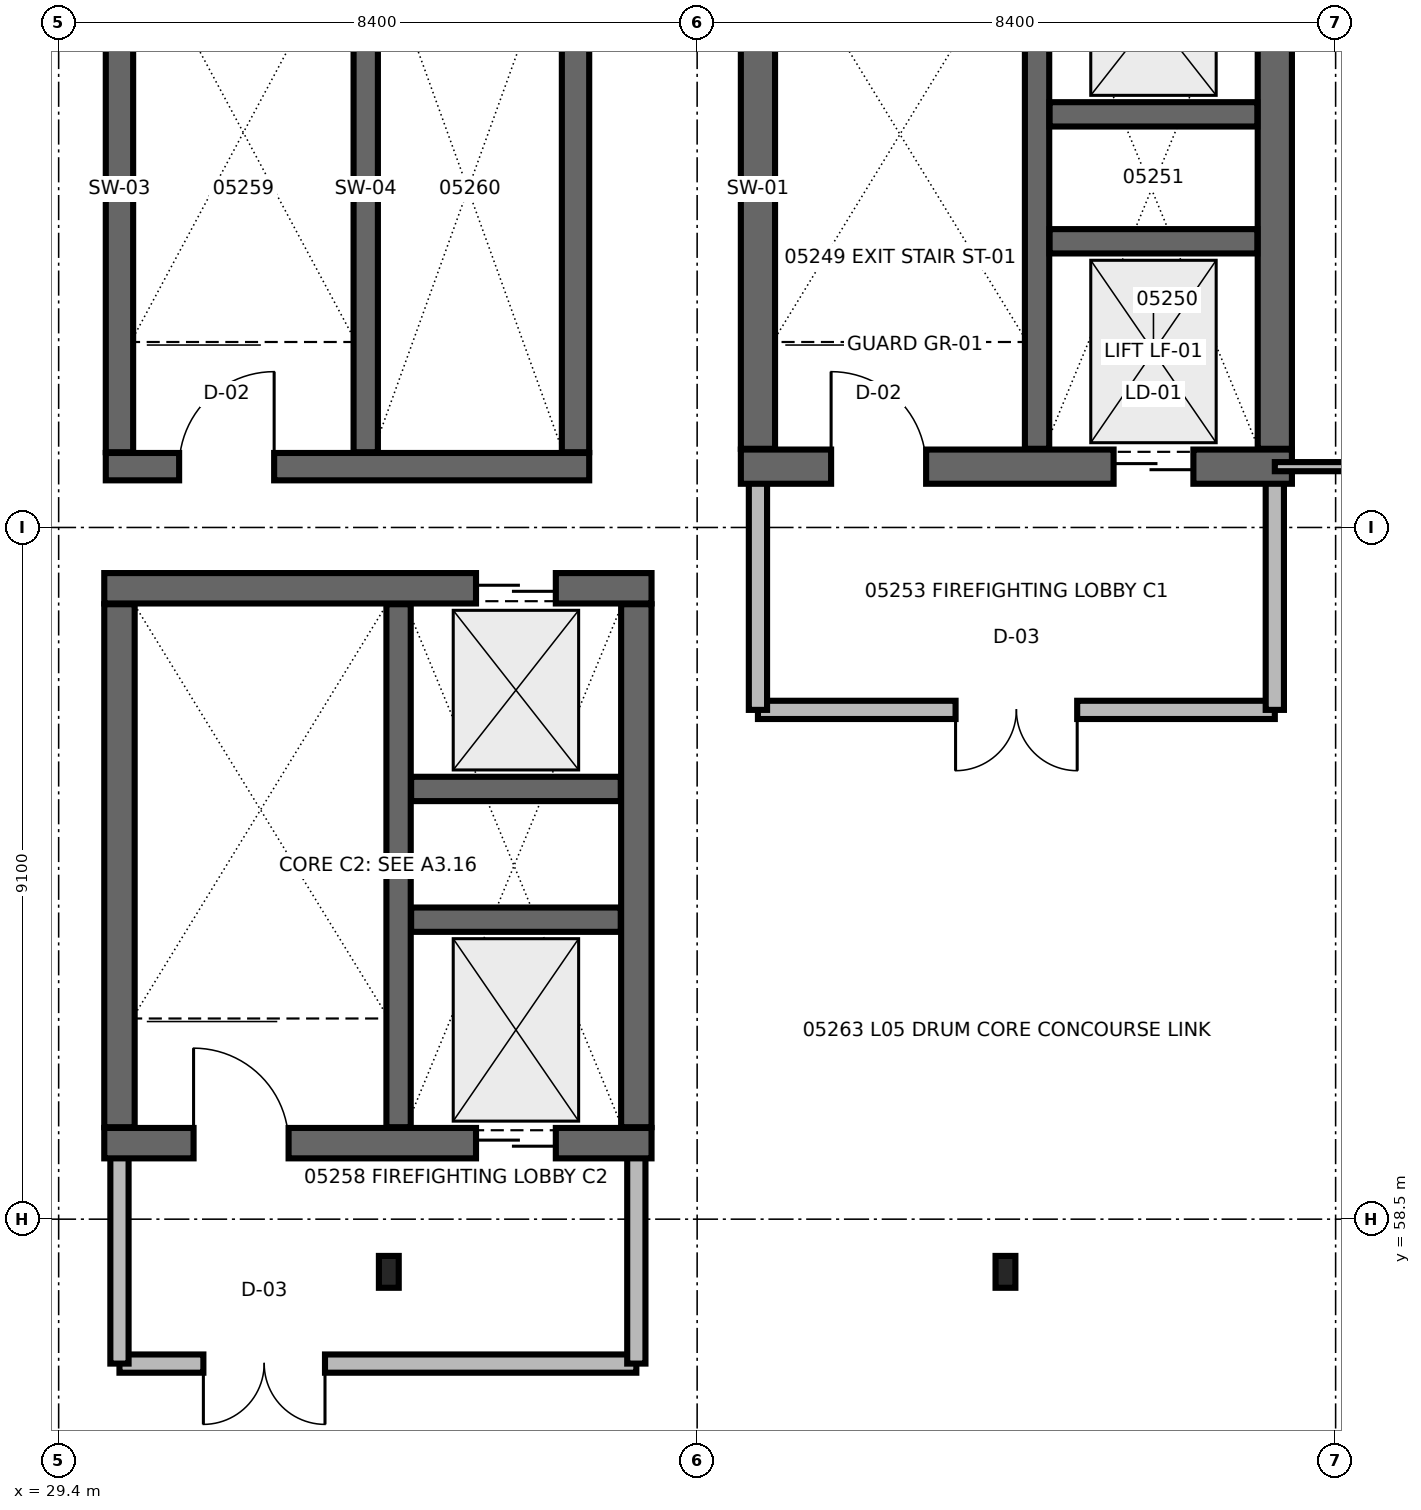
"""IFC4 building model, lengths in metres.
Left out: names, types, materials, properties, quantities, classifications, styles, units other than length and angle.
Written with IfcOpenShell. Run it as: python <this file> out.ifc"""

import sys

from ifc_helpers import new_model, si_unit, direction, frame, frame_2d, origin, origin_2d, place, context, subcontext, project, spatial, rectangle, i_section, extrude, element, fill, save


model = new_model("IFC4")
c1 = context("Model", 3, precision=1e-05, world=origin(), true_north=direction((0.0, 1.0)))
c2 = subcontext(c1, "Body", "Model", "MODEL_VIEW")
j1 = project(units=[si_unit("LENGTHUNIT", "METRE"), si_unit("PLANEANGLEUNIT", "RADIAN")], contexts=[c1])
p1 = place(None, origin())
s1 = spatial("IfcSite", under=j1, at=p1, CompositionType="ELEMENT")
p2 = place(p1, origin())
s2 = spatial("IfcBuilding", under=s1, at=p2, CompositionType="ELEMENT")
p3 = place(p2, frame((0.0, 0.0, 21.6)))
s3 = spatial("IfcBuildingStorey", under=s2, at=p3, CompositionType="ELEMENT", Elevation=21.6)
for number, where, z_axis, x_axis in (
    (1, (33.744, 57.807, 0.0), (0.0, 0.0, 1.0), (1.0, 0.0, 0.0)),
    (2, (41.856, 57.807, 0.0), (0.0, 0.0, 1.0), (1.0, 0.0, 0.0)),
):
    element("IfcColumn", number, at=place(p3, frame(where, z_axis=z_axis, x_axis=x_axis)), inside=s3, PredefinedType="COLUMN", context=c2, shape_type="SweptSolid", body=[
        extrude(i_section(OverallWidth=0.261, OverallDepth=0.419, WebThickness=0.012, FlangeThickness=0.019, at=origin_2d()), origin(), (0.0, 0.0, 1.0), 3.9),
    ])
p4 = place(p3, frame((38.6, 65.2, 0.0), z_axis=(0.0, 0.0, 1.0), x_axis=(1.0, 0.0, 0.0)))
e3 = element("IfcWall", 3, at=p4, inside=s3, PredefinedType="SOLIDWALL", context=c2, shape_type="SweptSolid", body=[
    extrude(rectangle(XDim=6.8, YDim=0.24, at=frame_2d((3.4, 0.0))), origin(), (0.0, 0.0, 1.0), 3.44),
])
p5 = place(p4, frame((2.6, 0.0, 0.0)))
e4 = element("IfcOpeningElement", 4, at=p5, cuts=e3, PredefinedType="OPENING", context=c2, shape_type="SweptSolid", body=[
    extrude(rectangle(XDim=1.6, YDim=2.2, at=frame_2d((0.8, 1.1))), frame((0.0, 0.13, 0.0), z_axis=(0.0, -1.0, 0.0), x_axis=(1.0, 0.0, 0.0)), (0.0, 0.0, 1.0), 0.26),
])
for number, where, z_axis, x_axis in (
    (5, (38.6, 68.4, 0.0), (0.0, 0.0, 1.0), (0.0, -1.0, 0.0)),
    (6, (45.4, 65.2, 0.0), (0.0, 0.0, 1.0), (0.0, 1.0, 0.0)),
):
    element("IfcWall", number, at=place(p3, frame(where, z_axis=z_axis, x_axis=x_axis)), inside=s3, PredefinedType="SOLIDWALL", context=c2, shape_type="SweptSolid", body=[
        extrude(rectangle(XDim=3.2, YDim=0.24, at=frame_2d((1.6, 0.0))), origin(), (0.0, 0.0, 1.0), 3.44),
    ])
p6 = place(p3, frame((38.375, 68.4, 0.0), z_axis=(0.0, 0.0, 1.0), x_axis=(1.0, 0.0, 0.0)))
e7 = element("IfcWall", 7, at=p6, inside=s3, PredefinedType="SHEAR", context=c2, shape_type="SweptSolid", body=[
    extrude(rectangle(XDim=7.25, YDim=0.45, at=frame_2d((3.625, 0.0))), origin(), (0.0, 0.0, 1.0), 3.62),
])
p7 = place(p6, frame((1.188, 0.0, 0.0)))
e8 = element("IfcOpeningElement", 8, at=p7, cuts=e7, PredefinedType="OPENING", context=c2, shape_type="SweptSolid", body=[
    extrude(rectangle(XDim=1.25, YDim=2.2, at=frame_2d((0.625, 1.1))), frame((0.0, 0.235, 0.0), z_axis=(0.0, -1.0, 0.0), x_axis=(1.0, 0.0, 0.0)), (0.0, 0.0, 1.0), 0.47),
])
p8 = place(p6, frame((4.904, 0.0, 0.0)))
e9 = element("IfcOpeningElement", 9, at=p8, cuts=e7, PredefinedType="OPENING", context=c2, shape_type="SweptSolid", body=[
    extrude(rectangle(XDim=1.05, YDim=2.15, at=frame_2d((0.525, 1.075))), frame((0.0, 0.235, 0.0), z_axis=(0.0, -1.0, 0.0), x_axis=(1.0, 0.0, 0.0)), (0.0, 0.0, 1.0), 0.47),
])
for number, where, z_axis, x_axis in (
    (10, (38.6, 68.635, 0.0), (0.0, 0.0, 1.0), (0.0, 1.0, 0.0)),
    (11, (45.4, 68.635, 0.0), (0.0, 0.0, 1.0), (0.0, 1.0, 0.0)),
):
    element("IfcWall", number, at=place(p3, frame(where, z_axis=z_axis, x_axis=x_axis)), inside=s3, PredefinedType="SHEAR", context=c2, shape_type="SweptSolid", body=[
        extrude(rectangle(XDim=6.83, YDim=0.45, at=frame_2d((3.415, 0.0))), origin(), (0.0, 0.0, 1.0), 3.62),
    ])
p9 = place(p3, frame((42.272, 68.635, 0.0), z_axis=(0.0, 0.0, 1.0), x_axis=(0.0, 1.0, 0.0)))
e12 = element("IfcWall", 12, at=p9, inside=s3, PredefinedType="SHEAR", context=c2, shape_type="SweptSolid", body=[
    extrude(rectangle(XDim=6.83, YDim=0.32, at=frame_2d((3.415, 0.0))), origin(), (0.0, 0.0, 1.0), 3.62),
])
for number, where, z_axis, x_axis in (
    (13, (42.437, 71.365, 0.0), (0.0, 0.0, 1.0), (1.0, 0.0, 0.0)),
    (14, (42.437, 73.035, 0.0), (0.0, 0.0, 1.0), (1.0, 0.0, 0.0)),
):
    element("IfcWall", number, at=place(p3, frame(where, z_axis=z_axis, x_axis=x_axis)), inside=s3, PredefinedType="SHEAR", context=c2, shape_type="SweptSolid", body=[
        extrude(rectangle(XDim=2.733, YDim=0.32, at=frame_2d((1.366, 0.0))), origin(), (0.0, 0.0, 1.0), 3.62),
    ])
p10 = place(p3, frame((30.2, 56.6, 0.0), z_axis=(0.0, 0.0, 1.0), x_axis=(1.0, 0.0, 0.0)))
e15 = element("IfcWall", 15, at=p10, inside=s3, PredefinedType="SOLIDWALL", context=c2, shape_type="SweptSolid", body=[
    extrude(rectangle(XDim=6.8, YDim=0.24, at=frame_2d((3.4, 0.0))), origin(), (0.0, 0.0, 1.0), 2.839),
])
p11 = place(p10, frame((1.104, 0.0, 0.0)))
e16 = element("IfcOpeningElement", 16, at=p11, cuts=e15, PredefinedType="OPENING", context=c2, shape_type="SweptSolid", body=[
    extrude(rectangle(XDim=1.6, YDim=2.2, at=frame_2d((0.8, 1.1))), frame((0.0, 0.13, 0.0), z_axis=(0.0, -1.0, 0.0), x_axis=(1.0, 0.0, 0.0)), (0.0, 0.0, 1.0), 0.26),
])
p12 = place(p3, frame((30.2, 59.5, 0.0), z_axis=(0.0, 0.0, 1.0), x_axis=(0.0, -1.0, 0.0)))
e17 = element("IfcWall", 17, at=p12, inside=s3, PredefinedType="SOLIDWALL", context=c2, shape_type="SweptSolid", body=[
    extrude(rectangle(XDim=2.9, YDim=0.24, at=frame_2d((1.45, 0.0))), origin(), (0.0, 0.0, 1.0), 3.44),
])
p13 = place(p3, frame((37.0, 56.6, 0.0), z_axis=(0.0, 0.0, 1.0), x_axis=(0.0, 1.0, 0.0)))
e18 = element("IfcWall", 18, at=p13, inside=s3, PredefinedType="SOLIDWALL", context=c2, shape_type="SweptSolid", body=[
    extrude(rectangle(XDim=2.9, YDim=0.24, at=frame_2d((1.45, 0.0))), origin(), (0.0, 0.0, 1.0), 2.839),
])
p14 = place(p3, frame((30.0, 59.5, 0.0), z_axis=(0.0, 0.0, 1.0), x_axis=(1.0, 0.0, 0.0)))
e19 = element("IfcWall", 19, at=p14, inside=s3, PredefinedType="SHEAR", context=c2, shape_type="SweptSolid", body=[
    extrude(rectangle(XDim=7.2, YDim=0.4, at=frame_2d((3.6, 0.0))), origin(), (0.0, 0.0, 1.0), 3.62),
])
p15 = place(p14, frame((1.175, 0.0, 0.0)))
e20 = element("IfcOpeningElement", 20, at=p15, cuts=e19, PredefinedType="OPENING", context=c2, shape_type="SweptSolid", body=[
    extrude(rectangle(XDim=1.25, YDim=2.2, at=frame_2d((0.625, 1.1))), frame((0.0, 0.21, 0.0), z_axis=(0.0, -1.0, 0.0), x_axis=(1.0, 0.0, 0.0)), (0.0, 0.0, 1.0), 0.42),
])
p16 = place(p14, frame((4.891, 0.0, 0.0)))
e21 = element("IfcOpeningElement", 21, at=p16, cuts=e19, PredefinedType="OPENING", context=c2, shape_type="SweptSolid", body=[
    extrude(rectangle(XDim=1.05, YDim=2.15, at=frame_2d((0.525, 1.075))), frame((0.0, 0.21, 0.0), z_axis=(0.0, -1.0, 0.0), x_axis=(1.0, 0.0, 0.0)), (0.0, 0.0, 1.0), 0.42),
])
p17 = place(p3, frame((30.0, 66.8, 0.0), z_axis=(0.0, 0.0, 1.0), x_axis=(1.0, 0.0, 0.0)))
e22 = element("IfcWall", 22, at=p17, inside=s3, PredefinedType="SHEAR", context=c2, shape_type="SweptSolid", body=[
    extrude(rectangle(XDim=7.2, YDim=0.4, at=frame_2d((3.6, 0.0))), origin(), (0.0, 0.0, 1.0), 3.62),
])
p18 = place(p17, frame((4.891, 0.0, 0.0)))
e23 = element("IfcOpeningElement", 23, at=p18, cuts=e22, PredefinedType="OPENING", context=c2, shape_type="SweptSolid", body=[
    extrude(rectangle(XDim=1.05, YDim=2.15, at=frame_2d((0.525, 1.075))), frame((0.0, 0.21, 0.0), z_axis=(0.0, -1.0, 0.0), x_axis=(1.0, 0.0, 0.0)), (0.0, 0.0, 1.0), 0.42),
])
for number, where, z_axis, x_axis in (
    (24, (30.2, 59.71, 0.0), (0.0, 0.0, 1.0), (0.0, 1.0, 0.0)),
    (25, (37.0, 59.71, 0.0), (0.0, 0.0, 1.0), (0.0, 1.0, 0.0)),
):
    element("IfcWall", number, at=place(p3, frame(where, z_axis=z_axis, x_axis=x_axis)), inside=s3, PredefinedType="SHEAR", context=c2, shape_type="SweptSolid", body=[
        extrude(rectangle(XDim=6.88, YDim=0.4, at=frame_2d((3.44, 0.0))), origin(), (0.0, 0.0, 1.0), 3.62),
    ])
p19 = place(p3, frame((33.872, 59.71, 0.0), z_axis=(0.0, 0.0, 1.0), x_axis=(0.0, 1.0, 0.0)))
e26 = element("IfcWall", 26, at=p19, inside=s3, PredefinedType="SHEAR", context=c2, shape_type="SweptSolid", body=[
    extrude(rectangle(XDim=6.88, YDim=0.32, at=frame_2d((3.44, 0.0))), origin(), (0.0, 0.0, 1.0), 3.62),
])
for number, where, z_axis, x_axis in (
    (27, (34.037, 62.44, 0.0), (0.0, 0.0, 1.0), (1.0, 0.0, 0.0)),
    (28, (34.037, 64.16, 0.0), (0.0, 0.0, 1.0), (1.0, 0.0, 0.0)),
):
    element("IfcWall", number, at=place(p3, frame(where, z_axis=z_axis, x_axis=x_axis)), inside=s3, PredefinedType="SHEAR", context=c2, shape_type="SweptSolid", body=[
        extrude(rectangle(XDim=2.758, YDim=0.32, at=frame_2d((1.379, 0.0))), origin(), (0.0, 0.0, 1.0), 3.62),
    ])
p20 = place(p3, frame((30.02, 68.4, 0.0), z_axis=(0.0, 0.0, 1.0), x_axis=(1.0, 0.0, 0.0)))
e29 = element("IfcWall", 29, at=p20, inside=s3, PredefinedType="SHEAR", context=c2, shape_type="SweptSolid", body=[
    extrude(rectangle(XDim=6.36, YDim=0.36, at=frame_2d((3.18, 0.0))), origin(), (0.0, 0.0, 1.0), 3.62),
])
p21 = place(p20, frame((0.965, 0.0, 0.0)))
e30 = element("IfcOpeningElement", 30, at=p21, cuts=e29, PredefinedType="OPENING", context=c2, shape_type="SweptSolid", body=[
    extrude(rectangle(XDim=1.25, YDim=2.2, at=frame_2d((0.625, 1.1))), frame((0.0, 0.19, 0.0), z_axis=(0.0, -1.0, 0.0), x_axis=(1.0, 0.0, 0.0)), (0.0, 0.0, 1.0), 0.38),
])
for number, where, z_axis, x_axis in (
    (31, (30.2, 68.59, 0.0), (0.0, 0.0, 1.0), (0.0, 1.0, 0.0)),
    (32, (36.2, 68.59, 0.0), (0.0, 0.0, 1.0), (0.0, 1.0, 0.0)),
):
    element("IfcWall", number, at=place(p3, frame(where, z_axis=z_axis, x_axis=x_axis)), inside=s3, PredefinedType="SHEAR", context=c2, shape_type="SweptSolid", body=[
        extrude(rectangle(XDim=6.92, YDim=0.36, at=frame_2d((3.46, 0.0))), origin(), (0.0, 0.0, 1.0), 3.62),
    ])
p22 = place(p3, frame((33.44, 68.59, 0.0), z_axis=(0.0, 0.0, 1.0), x_axis=(0.0, 1.0, 0.0)))
e33 = element("IfcWall", 33, at=p22, inside=s3, PredefinedType="SHEAR", context=c2, shape_type="SweptSolid", body=[
    extrude(rectangle(XDim=6.92, YDim=0.32, at=frame_2d((3.46, 0.0))), origin(), (0.0, 0.0, 1.0), 3.62),
])
p23 = place(p3, frame((45.4, 68.4, 0.0), z_axis=(0.0, 0.0, 1.0), x_axis=(1.0, 0.0, 0.0)))
e34 = element("IfcWall", 34, at=p23, inside=s3, PredefinedType="PARTITIONING", context=c2, shape_type="SweptSolid", body=[
    extrude(rectangle(XDim=2.15, YDim=0.12, at=frame_2d((1.075, 0.0))), origin(), (0.0, 0.0, 1.0), 3.44),
])
p24 = place(p5, frame((1.6, 0.0, 0.0), z_axis=(0.0, 0.0, 1.0), x_axis=(-1.0, 0.0, 0.0)))
e35 = element("IfcDoor", 35, at=p24, inside=s3, OperationType="DOUBLE_DOOR_SINGLE_SWING", PredefinedType="DOOR", context=c2, shape_type="SweptSolid", body=[
    extrude(rectangle(XDim=1.6, YDim=2.2, at=frame_2d((0.8, 1.1))), frame((0.0, 0.025, 0.0), z_axis=(0.0, -1.0, 0.0), x_axis=(1.0, 0.0, 0.0)), (0.0, 0.0, 1.0), 0.05),
])
fill(e4, e35)
p25 = place(p7, frame((1.25, 0.0, 0.0), z_axis=(0.0, 0.0, 1.0), x_axis=(-1.0, 0.0, 0.0)))
e36 = element("IfcDoor", 36, at=p25, inside=s3, OperationType="SINGLE_SWING_RIGHT", PredefinedType="DOOR", context=c2, shape_type="SweptSolid", body=[
    extrude(rectangle(XDim=1.25, YDim=2.2, at=frame_2d((0.625, 1.1))), frame((0.0, 0.025, 0.0), z_axis=(0.0, -1.0, 0.0), x_axis=(1.0, 0.0, 0.0)), (0.0, 0.0, 1.0), 0.05),
])
fill(e8, e36)
p26 = place(p8, frame((1.05, 0.0, 0.0), z_axis=(0.0, 0.0, 1.0), x_axis=(-1.0, 0.0, 0.0)))
e37 = element("IfcDoor", 37, at=p26, inside=s3, OperationType="DOUBLE_DOOR_SLIDING", PredefinedType="DOOR", context=c2, shape_type="SweptSolid", body=[
    extrude(rectangle(XDim=1.05, YDim=2.15, at=frame_2d((0.525, 1.075))), frame((0.0, 0.025, 0.0), z_axis=(0.0, -1.0, 0.0), x_axis=(1.0, 0.0, 0.0)), (0.0, 0.0, 1.0), 0.05),
])
fill(e9, e37)
p27 = place(p11, frame((1.6, 0.0, 0.0), z_axis=(0.0, 0.0, 1.0), x_axis=(-1.0, 0.0, 0.0)))
e38 = element("IfcDoor", 38, at=p27, inside=s3, OperationType="DOUBLE_DOOR_SINGLE_SWING", PredefinedType="DOOR", context=c2, shape_type="SweptSolid", body=[
    extrude(rectangle(XDim=1.6, YDim=2.2, at=frame_2d((0.8, 1.1))), frame((0.0, 0.025, 0.0), z_axis=(0.0, -1.0, 0.0), x_axis=(1.0, 0.0, 0.0)), (0.0, 0.0, 1.0), 0.05),
])
fill(e16, e38)
p28 = place(p15, frame((1.25, 0.0, 0.0), z_axis=(0.0, 0.0, 1.0), x_axis=(-1.0, 0.0, 0.0)))
e39 = element("IfcDoor", 39, at=p28, inside=s3, OperationType="SINGLE_SWING_RIGHT", PredefinedType="DOOR", context=c2, shape_type="SweptSolid", body=[
    extrude(rectangle(XDim=1.25, YDim=2.2, at=frame_2d((0.625, 1.1))), frame((0.0, 0.025, 0.0), z_axis=(0.0, -1.0, 0.0), x_axis=(1.0, 0.0, 0.0)), (0.0, 0.0, 1.0), 0.05),
])
fill(e20, e39)
p29 = place(p16, frame((1.05, 0.0, 0.0), z_axis=(0.0, 0.0, 1.0), x_axis=(-1.0, 0.0, 0.0)))
e40 = element("IfcDoor", 40, at=p29, inside=s3, OperationType="DOUBLE_DOOR_SLIDING", PredefinedType="DOOR", context=c2, shape_type="SweptSolid", body=[
    extrude(rectangle(XDim=1.05, YDim=2.15, at=frame_2d((0.525, 1.075))), frame((0.0, 0.025, 0.0), z_axis=(0.0, -1.0, 0.0), x_axis=(1.0, 0.0, 0.0)), (0.0, 0.0, 1.0), 0.05),
])
fill(e21, e40)
p30 = place(p18, origin())
e41 = element("IfcDoor", 41, at=p30, inside=s3, OperationType="DOUBLE_DOOR_SLIDING", PredefinedType="DOOR", context=c2, shape_type="SweptSolid", body=[
    extrude(rectangle(XDim=1.05, YDim=2.15, at=frame_2d((0.525, 1.075))), frame((0.0, 0.025, 0.0), z_axis=(0.0, -1.0, 0.0), x_axis=(1.0, 0.0, 0.0)), (0.0, 0.0, 1.0), 0.05),
])
fill(e23, e41)
p31 = place(p21, frame((1.25, 0.0, 0.0), z_axis=(0.0, 0.0, 1.0), x_axis=(-1.0, 0.0, 0.0)))
e42 = element("IfcDoor", 42, at=p31, inside=s3, OperationType="SINGLE_SWING_LEFT", PredefinedType="DOOR", context=c2, shape_type="SweptSolid", body=[
    extrude(rectangle(XDim=1.25, YDim=2.2, at=frame_2d((0.625, 1.1))), frame((0.0, 0.025, 0.0), z_axis=(0.0, -1.0, 0.0), x_axis=(1.0, 0.0, 0.0)), (0.0, 0.0, 1.0), 0.05),
])
fill(e30, e42)
save(model, sys.argv[1])
